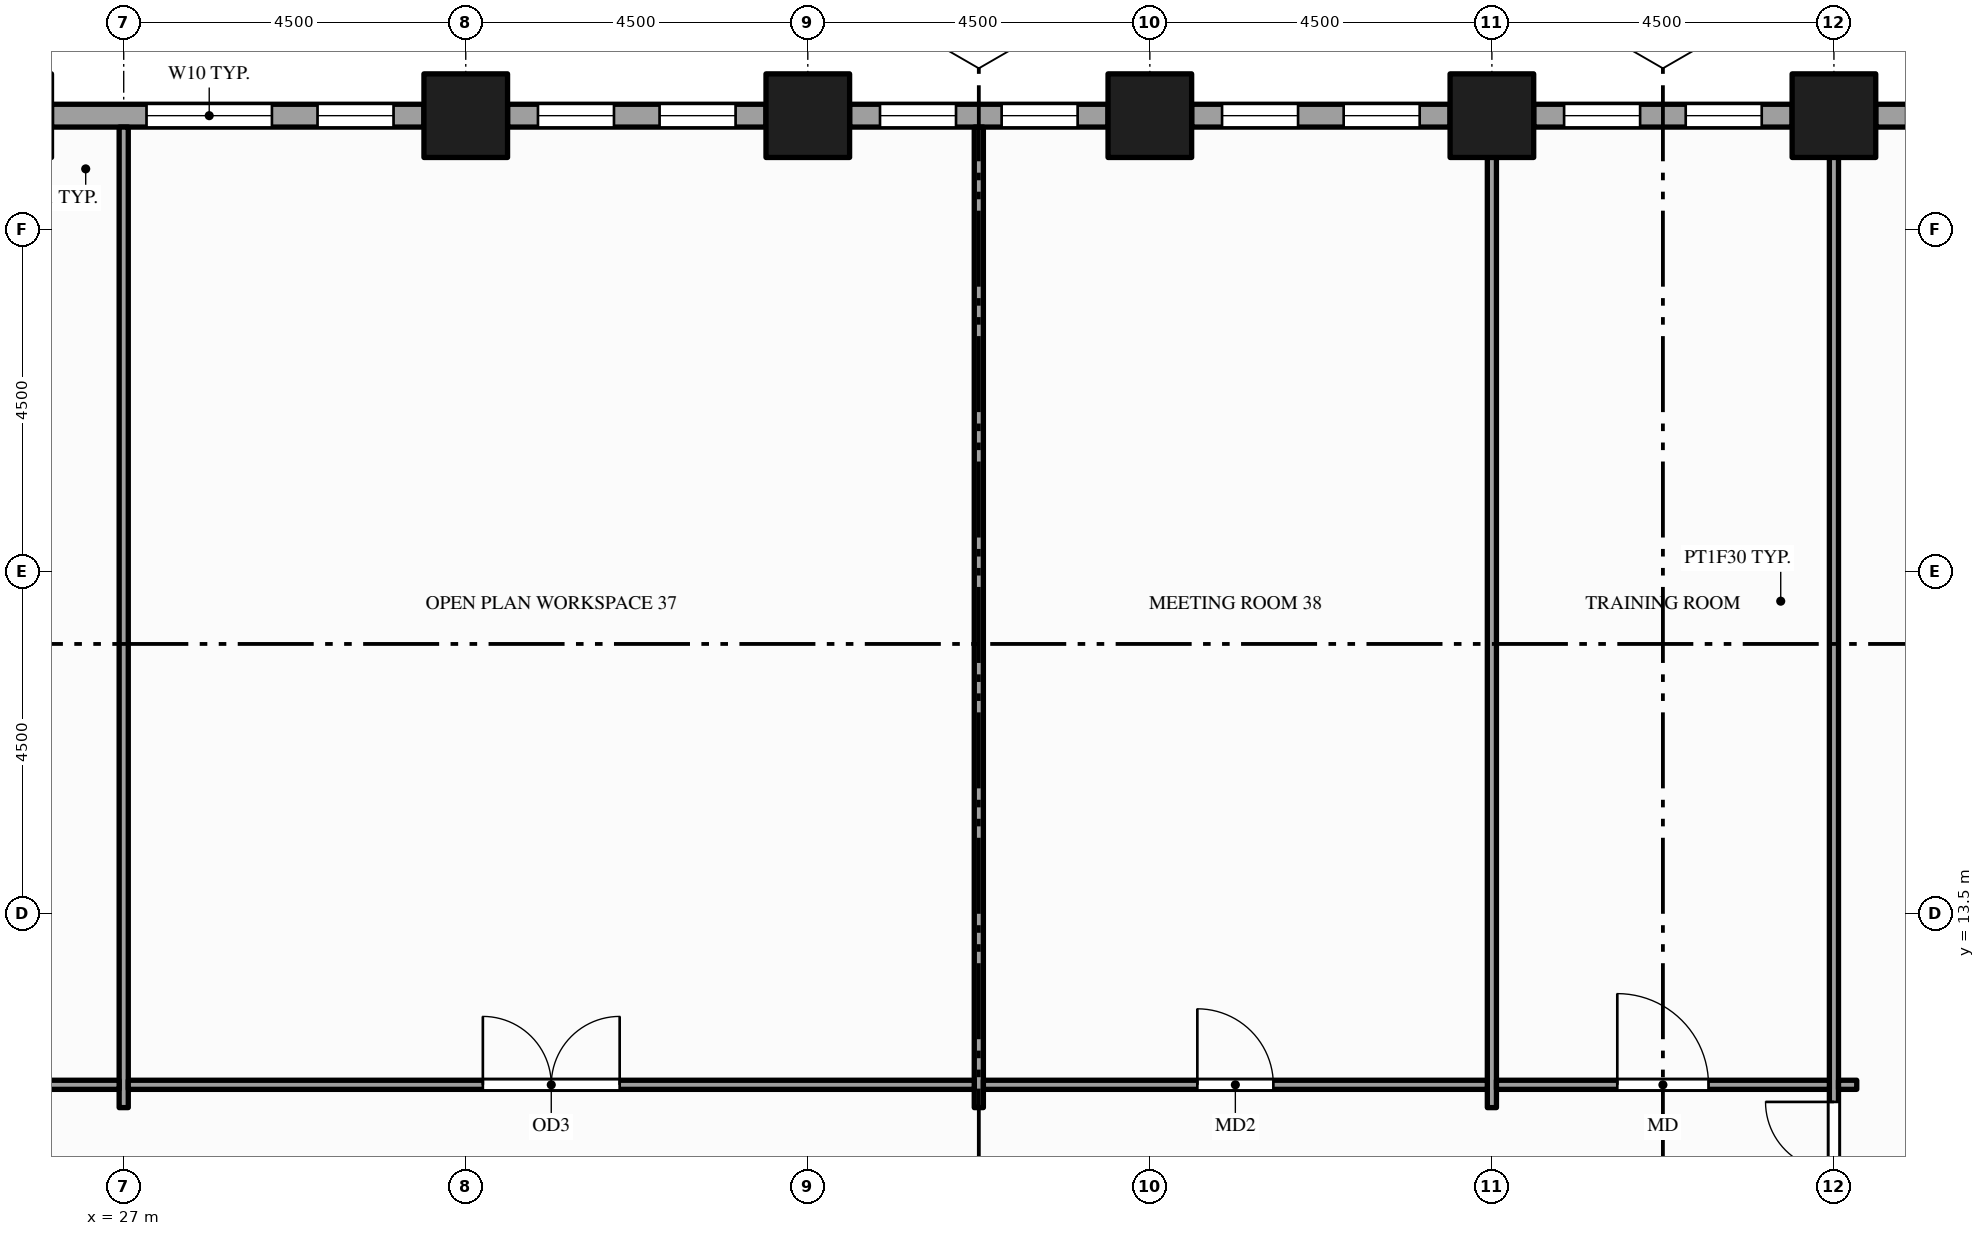
"""IFC4 building model, lengths in metres.
Left out: names, types, materials, properties, quantities, classifications, styles, units other than length and angle.
Written with IfcOpenShell. Run it as: python <this file> out.ifc"""

import sys

from ifc_helpers import new_model, si_unit, direction, frame, frame_2d, origin, origin_2d, place, context, subcontext, project, spatial, rectangle, hollow_rectangle, extrude, element, fill, save


model = new_model("IFC4")
c1 = context("Model", 3, precision=1e-05, world=origin(), true_north=direction((0.0, 1.0)))
c2 = subcontext(c1, "Body", "Model", "MODEL_VIEW")
j1 = project(units=[si_unit("LENGTHUNIT", "METRE"), si_unit("PLANEANGLEUNIT", "RADIAN")], contexts=[c1])
p1 = place(None, origin())
s1 = spatial("IfcSite", under=j1, at=p1, CompositionType="ELEMENT")
p2 = place(p1, origin())
s2 = spatial("IfcBuilding", under=s1, at=p2, CompositionType="ELEMENT")
p3 = place(p2, frame((0.0, 0.0, 33.0)))
s3 = spatial("IfcBuildingStorey", under=s2, at=p3, CompositionType="ELEMENT", Elevation=33.0)
for number, where, z_axis, x_axis in (
    (1, (31.5, 24.0, -0.15), (0.0, 0.0, 1.0), (1.0, 0.0, 0.0)),
    (2, (36.0, 24.0, -0.15), (0.0, 0.0, 1.0), (1.0, 0.0, 0.0)),
    (3, (40.5, 24.0, -0.15), (0.0, 0.0, 1.0), (1.0, 0.0, 0.0)),
    (4, (45.0, 24.0, -0.15), (0.0, 0.0, 1.0), (1.0, 0.0, 0.0)),
    (5, (49.5, 24.0, -0.15), (0.0, 0.0, 1.0), (1.0, 0.0, 0.0)),
):
    element("IfcColumn", number, at=place(p3, frame(where, z_axis=z_axis, x_axis=x_axis)), inside=s3, PredefinedType="COLUMN", context=c2, shape_type="SweptSolid", body=[
        extrude(hollow_rectangle(XDim=1.1, YDim=1.1, WallThickness=0.06, at=origin_2d()), origin(), (0.0, 0.0, 1.0), 4.0),
    ])
p4 = place(p3, frame((53.45, 24.0, 0.0), z_axis=(0.0, 0.0, 1.0), x_axis=(-1.0, 0.0, 0.0)))
e6 = element("IfcWall", 6, at=p4, inside=s3, PredefinedType="STANDARD", context=c2, shape_type="SweptSolid", body=[
    extrude(rectangle(XDim=3.4, YDim=0.3, at=frame_2d((1.7, 0.0))), origin(), (0.0, 0.0, 1.0), 3.144),
])
p5 = place(p4, frame((0.4, 0.0, 0.9)))
e7 = element("IfcOpeningElement", 7, at=p5, cuts=e6, PredefinedType="OPENING", context=c2, shape_type="SweptSolid", body=[
    extrude(rectangle(XDim=1.0, YDim=2.0, at=frame_2d((0.5, 1.0))), frame((0.0, 0.16, 0.0), z_axis=(0.0, -1.0, 0.0), x_axis=(1.0, 0.0, 0.0)), (0.0, 0.0, 1.0), 0.32),
])
p6 = place(p4, frame((2.0, 0.0, 0.9)))
e8 = element("IfcOpeningElement", 8, at=p6, cuts=e6, PredefinedType="OPENING", context=c2, shape_type="SweptSolid", body=[
    extrude(rectangle(XDim=1.0, YDim=2.0, at=frame_2d((0.5, 1.0))), frame((0.0, 0.16, 0.0), z_axis=(0.0, -1.0, 0.0), x_axis=(1.0, 0.0, 0.0)), (0.0, 0.0, 1.0), 0.32),
])
p7 = place(p3, frame((48.95, 24.0, 0.0), z_axis=(0.0, 0.0, 1.0), x_axis=(-1.0, 0.0, 0.0)))
e9 = element("IfcWall", 9, at=p7, inside=s3, PredefinedType="STANDARD", context=c2, shape_type="SweptSolid", body=[
    extrude(rectangle(XDim=3.4, YDim=0.3, at=frame_2d((1.7, 0.0))), origin(), (0.0, 0.0, 1.0), 3.144),
])
p8 = place(p7, frame((0.4, 0.0, 0.9)))
e10 = element("IfcOpeningElement", 10, at=p8, cuts=e9, PredefinedType="OPENING", context=c2, shape_type="SweptSolid", body=[
    extrude(rectangle(XDim=1.0, YDim=2.0, at=frame_2d((0.5, 1.0))), frame((0.0, 0.16, 0.0), z_axis=(0.0, -1.0, 0.0), x_axis=(1.0, 0.0, 0.0)), (0.0, 0.0, 1.0), 0.32),
])
p9 = place(p7, frame((2.0, 0.0, 0.9)))
e11 = element("IfcOpeningElement", 11, at=p9, cuts=e9, PredefinedType="OPENING", context=c2, shape_type="SweptSolid", body=[
    extrude(rectangle(XDim=1.0, YDim=2.0, at=frame_2d((0.5, 1.0))), frame((0.0, 0.16, 0.0), z_axis=(0.0, -1.0, 0.0), x_axis=(1.0, 0.0, 0.0)), (0.0, 0.0, 1.0), 0.32),
])
p10 = place(p3, frame((44.45, 24.0, 0.0), z_axis=(0.0, 0.0, 1.0), x_axis=(-1.0, 0.0, 0.0)))
e12 = element("IfcWall", 12, at=p10, inside=s3, PredefinedType="STANDARD", context=c2, shape_type="SweptSolid", body=[
    extrude(rectangle(XDim=3.4, YDim=0.3, at=frame_2d((1.7, 0.0))), origin(), (0.0, 0.0, 1.0), 3.144),
])
p11 = place(p10, frame((0.4, 0.0, 0.9)))
e13 = element("IfcOpeningElement", 13, at=p11, cuts=e12, PredefinedType="OPENING", context=c2, shape_type="SweptSolid", body=[
    extrude(rectangle(XDim=1.0, YDim=2.0, at=frame_2d((0.5, 1.0))), frame((0.0, 0.16, 0.0), z_axis=(0.0, -1.0, 0.0), x_axis=(1.0, 0.0, 0.0)), (0.0, 0.0, 1.0), 0.32),
])
p12 = place(p10, frame((2.0, 0.0, 0.9)))
e14 = element("IfcOpeningElement", 14, at=p12, cuts=e12, PredefinedType="OPENING", context=c2, shape_type="SweptSolid", body=[
    extrude(rectangle(XDim=1.0, YDim=2.0, at=frame_2d((0.5, 1.0))), frame((0.0, 0.16, 0.0), z_axis=(0.0, -1.0, 0.0), x_axis=(1.0, 0.0, 0.0)), (0.0, 0.0, 1.0), 0.32),
])
p13 = place(p3, frame((39.95, 24.0, 0.0), z_axis=(0.0, 0.0, 1.0), x_axis=(-1.0, 0.0, 0.0)))
e15 = element("IfcWall", 15, at=p13, inside=s3, PredefinedType="STANDARD", context=c2, shape_type="SweptSolid", body=[
    extrude(rectangle(XDim=3.4, YDim=0.3, at=frame_2d((1.7, 0.0))), origin(), (0.0, 0.0, 1.0), 3.144),
])
p14 = place(p13, frame((0.4, 0.0, 0.9)))
e16 = element("IfcOpeningElement", 16, at=p14, cuts=e15, PredefinedType="OPENING", context=c2, shape_type="SweptSolid", body=[
    extrude(rectangle(XDim=1.0, YDim=2.0, at=frame_2d((0.5, 1.0))), frame((0.0, 0.16, 0.0), z_axis=(0.0, -1.0, 0.0), x_axis=(1.0, 0.0, 0.0)), (0.0, 0.0, 1.0), 0.32),
])
p15 = place(p13, frame((2.0, 0.0, 0.9)))
e17 = element("IfcOpeningElement", 17, at=p15, cuts=e15, PredefinedType="OPENING", context=c2, shape_type="SweptSolid", body=[
    extrude(rectangle(XDim=1.0, YDim=2.0, at=frame_2d((0.5, 1.0))), frame((0.0, 0.16, 0.0), z_axis=(0.0, -1.0, 0.0), x_axis=(1.0, 0.0, 0.0)), (0.0, 0.0, 1.0), 0.32),
])
p16 = place(p3, frame((35.45, 24.0, 0.0), z_axis=(0.0, 0.0, 1.0), x_axis=(-1.0, 0.0, 0.0)))
e18 = element("IfcWall", 18, at=p16, inside=s3, PredefinedType="STANDARD", context=c2, shape_type="SweptSolid", body=[
    extrude(rectangle(XDim=3.4, YDim=0.3, at=frame_2d((1.7, 0.0))), origin(), (0.0, 0.0, 1.0), 3.144),
])
p17 = place(p16, frame((0.4, 0.0, 0.9)))
e19 = element("IfcOpeningElement", 19, at=p17, cuts=e18, PredefinedType="OPENING", context=c2, shape_type="SweptSolid", body=[
    extrude(rectangle(XDim=1.0, YDim=2.0, at=frame_2d((0.5, 1.0))), frame((0.0, 0.16, 0.0), z_axis=(0.0, -1.0, 0.0), x_axis=(1.0, 0.0, 0.0)), (0.0, 0.0, 1.0), 0.32),
])
p18 = place(p16, frame((2.0, 0.0, 0.9)))
e20 = element("IfcOpeningElement", 20, at=p18, cuts=e18, PredefinedType="OPENING", context=c2, shape_type="SweptSolid", body=[
    extrude(rectangle(XDim=1.0, YDim=2.0, at=frame_2d((0.5, 1.0))), frame((0.0, 0.16, 0.0), z_axis=(0.0, -1.0, 0.0), x_axis=(1.0, 0.0, 0.0)), (0.0, 0.0, 1.0), 0.32),
])
p19 = place(p3, frame((30.95, 24.0, 0.0), z_axis=(0.0, 0.0, 1.0), x_axis=(-1.0, 0.0, 0.0)))
e21 = element("IfcWall", 21, at=p19, inside=s3, PredefinedType="STANDARD", context=c2, shape_type="SweptSolid", body=[
    extrude(rectangle(XDim=4.9, YDim=0.3, at=frame_2d((2.45, 0.0))), origin(), (0.0, 0.0, 1.0), 3.144),
])
p20 = place(p19, frame((0.4, 0.0, 0.9)))
e22 = element("IfcOpeningElement", 22, at=p20, cuts=e21, PredefinedType="OPENING", context=c2, shape_type="SweptSolid", body=[
    extrude(rectangle(XDim=1.0, YDim=2.0, at=frame_2d((0.5, 1.0))), frame((0.0, 0.16, 0.0), z_axis=(0.0, -1.0, 0.0), x_axis=(1.0, 0.0, 0.0)), (0.0, 0.0, 1.0), 0.32),
])
p21 = place(p19, frame((2.0, 0.0, 0.9)))
e23 = element("IfcOpeningElement", 23, at=p21, cuts=e21, PredefinedType="OPENING", context=c2, shape_type="SweptSolid", body=[
    extrude(rectangle(XDim=1.65, YDim=2.0, at=frame_2d((0.825, 1.0))), frame((0.0, 0.16, 0.0), z_axis=(0.0, -1.0, 0.0), x_axis=(1.0, 0.0, 0.0)), (0.0, 0.0, 1.0), 0.32),
])
for number, where, z_axis, x_axis in (
    (24, (27.0, 10.95, 0.0), (0.0, 0.0, 1.0), (0.0, 1.0, 0.0)),
    (25, (38.25, 10.95, 0.0), (0.0, 0.0, 1.0), (0.0, 1.0, 0.0)),
    (26, (45.0, 10.95, 0.0), (0.0, 0.0, 1.0), (0.0, 1.0, 0.0)),
):
    element("IfcWall", number, at=place(p3, frame(where, z_axis=z_axis, x_axis=x_axis)), inside=s3, PredefinedType="PARTITIONING", context=c2, shape_type="SweptSolid", body=[
        extrude(rectangle(XDim=12.9, YDim=0.12, at=frame_2d((6.45, 0.0))), origin(), (0.0, 0.0, 1.0), 2.938),
    ])
p22 = place(p3, frame((49.5, 1.65, 0.0), z_axis=(0.0, 0.0, 1.0), x_axis=(0.0, 1.0, 0.0)))
e27 = element("IfcWall", 27, at=p22, inside=s3, PredefinedType="PARTITIONING", context=c2, shape_type="SweptSolid", body=[
    extrude(rectangle(XDim=22.2, YDim=0.12, at=frame_2d((11.1, 0.0))), origin(), (0.0, 0.0, 1.0), 2.938),
])
p23 = place(p22, frame((7.575, 0.0, 0.0)))
e28 = element("IfcOpeningElement", 28, at=p23, cuts=e27, PredefinedType="OPENING", context=c2, shape_type="SweptSolid", body=[
    extrude(rectangle(XDim=1.8, YDim=2.1, at=frame_2d((0.9, 1.05))), frame((0.0, 0.07, 0.0), z_axis=(0.0, -1.0, 0.0), x_axis=(1.0, 0.0, 0.0)), (0.0, 0.0, 1.0), 0.14),
])
p24 = place(p22, frame((0.85, 0.0, 0.0)))
e29 = element("IfcOpeningElement", 29, at=p24, cuts=e27, PredefinedType="OPENING", context=c2, shape_type="SweptSolid", body=[
    extrude(rectangle(XDim=0.9, YDim=2.1, at=frame_2d((0.45, 1.05))), frame((0.0, 0.07, 0.0), z_axis=(0.0, -1.0, 0.0), x_axis=(1.0, 0.0, 0.0)), (0.0, 0.0, 1.0), 0.14),
])
p25 = place(p22, frame((3.15, 0.0, 0.0)))
e30 = element("IfcOpeningElement", 30, at=p25, cuts=e27, PredefinedType="OPENING", context=c2, shape_type="SweptSolid", body=[
    extrude(rectangle(XDim=0.9, YDim=2.1, at=frame_2d((0.45, 1.05))), frame((0.0, 0.07, 0.0), z_axis=(0.0, -1.0, 0.0), x_axis=(1.0, 0.0, 0.0)), (0.0, 0.0, 1.0), 0.14),
])
p26 = place(p22, frame((5.35, 0.0, 0.0)))
e31 = element("IfcOpeningElement", 31, at=p26, cuts=e27, PredefinedType="OPENING", context=c2, shape_type="SweptSolid", body=[
    extrude(rectangle(XDim=1.0, YDim=2.1, at=frame_2d((0.5, 1.05))), frame((0.0, 0.07, 0.0), z_axis=(0.0, -1.0, 0.0), x_axis=(1.0, 0.0, 0.0)), (0.0, 0.0, 1.0), 0.14),
])
p27 = place(p3, frame((11.31, 11.25, 0.0), z_axis=(0.0, 0.0, 1.0), x_axis=(1.0, 0.0, 0.0)))
e32 = element("IfcWall", 32, at=p27, inside=s3, PredefinedType="PARTITIONING", context=c2, shape_type="SweptSolid", body=[
    extrude(rectangle(XDim=15.63, YDim=0.12, at=frame_2d((7.815, 0.0))), origin(), (0.0, 0.0, 1.0), 2.938),
])
p28 = place(p27, frame((3.54, 0.0, 0.0)))
e33 = element("IfcOpeningElement", 33, at=p28, cuts=e32, PredefinedType="OPENING", context=c2, shape_type="SweptSolid", body=[
    extrude(rectangle(XDim=1.8, YDim=2.1, at=frame_2d((0.9, 1.05))), frame((0.0, 0.07, 0.0), z_axis=(0.0, -1.0, 0.0), x_axis=(1.0, 0.0, 0.0)), (0.0, 0.0, 1.0), 0.14),
])
p29 = place(p3, frame((27.06, 11.25, 0.0), z_axis=(0.0, 0.0, 1.0), x_axis=(1.0, 0.0, 0.0)))
e34 = element("IfcWall", 34, at=p29, inside=s3, PredefinedType="PARTITIONING", context=c2, shape_type="SweptSolid", body=[
    extrude(rectangle(XDim=11.13, YDim=0.12, at=frame_2d((5.565, 0.0))), origin(), (0.0, 0.0, 1.0), 2.938),
])
p30 = place(p29, frame((4.665, 0.0, 0.0)))
e35 = element("IfcOpeningElement", 35, at=p30, cuts=e34, PredefinedType="OPENING", context=c2, shape_type="SweptSolid", body=[
    extrude(rectangle(XDim=1.8, YDim=2.1, at=frame_2d((0.9, 1.05))), frame((0.0, 0.07, 0.0), z_axis=(0.0, -1.0, 0.0), x_axis=(1.0, 0.0, 0.0)), (0.0, 0.0, 1.0), 0.14),
])
p31 = place(p3, frame((38.31, 11.25, 0.0), z_axis=(0.0, 0.0, 1.0), x_axis=(1.0, 0.0, 0.0)))
e36 = element("IfcWall", 36, at=p31, inside=s3, PredefinedType="PARTITIONING", context=c2, shape_type="SweptSolid", body=[
    extrude(rectangle(XDim=6.63, YDim=0.12, at=frame_2d((3.315, 0.0))), origin(), (0.0, 0.0, 1.0), 2.938),
])
p32 = place(p31, frame((2.815, 0.0, 0.0)))
e37 = element("IfcOpeningElement", 37, at=p32, cuts=e36, PredefinedType="OPENING", context=c2, shape_type="SweptSolid", body=[
    extrude(rectangle(XDim=1.0, YDim=2.1, at=frame_2d((0.5, 1.05))), frame((0.0, 0.07, 0.0), z_axis=(0.0, -1.0, 0.0), x_axis=(1.0, 0.0, 0.0)), (0.0, 0.0, 1.0), 0.14),
])
p33 = place(p3, frame((45.06, 11.25, 0.0), z_axis=(0.0, 0.0, 1.0), x_axis=(1.0, 0.0, 0.0)))
e38 = element("IfcWall", 38, at=p33, inside=s3, PredefinedType="PARTITIONING", context=c2, shape_type="SweptSolid", body=[
    extrude(rectangle(XDim=4.38, YDim=0.12, at=frame_2d((2.19, 0.0))), origin(), (0.0, 0.0, 1.0), 2.938),
])
p34 = place(p33, frame((1.59, 0.0, 0.0)))
e39 = element("IfcOpeningElement", 39, at=p34, cuts=e38, PredefinedType="OPENING", context=c2, shape_type="SweptSolid", body=[
    extrude(rectangle(XDim=1.2, YDim=2.1, at=frame_2d((0.6, 1.05))), frame((0.0, 0.07, 0.0), z_axis=(0.0, -1.0, 0.0), x_axis=(1.0, 0.0, 0.0)), (0.0, 0.0, 1.0), 0.14),
])
p35 = place(p3, frame((49.56, 11.25, 0.0), z_axis=(0.0, 0.0, 1.0), x_axis=(1.0, 0.0, 0.0)))
e40 = element("IfcWall", 40, at=p35, inside=s3, PredefinedType="PARTITIONING", context=c2, shape_type="SweptSolid", body=[
    extrude(rectangle(XDim=0.24, YDim=0.12, at=frame_2d((0.12, 0.0))), origin(), (0.0, 0.0, 1.0), 2.938),
])
p36 = place(p8, origin())
e41 = element("IfcWindow", 41, at=p36, inside=s3, PartitioningType="SINGLE_PANEL", PredefinedType="WINDOW", context=c2, shape_type="SweptSolid", body=[
    extrude(rectangle(XDim=1.0, YDim=2.0, at=frame_2d((0.5, 1.0))), frame((0.0, 0.03, 0.0), z_axis=(0.0, -1.0, 0.0), x_axis=(1.0, 0.0, 0.0)), (0.0, 0.0, 1.0), 0.06),
])
fill(e10, e41)
p37 = place(p9, origin())
e42 = element("IfcWindow", 42, at=p37, inside=s3, PartitioningType="SINGLE_PANEL", PredefinedType="WINDOW", context=c2, shape_type="SweptSolid", body=[
    extrude(rectangle(XDim=1.0, YDim=2.0, at=frame_2d((0.5, 1.0))), frame((0.0, 0.03, 0.0), z_axis=(0.0, -1.0, 0.0), x_axis=(1.0, 0.0, 0.0)), (0.0, 0.0, 1.0), 0.06),
])
fill(e11, e42)
p38 = place(p11, origin())
e43 = element("IfcWindow", 43, at=p38, inside=s3, PartitioningType="SINGLE_PANEL", PredefinedType="WINDOW", context=c2, shape_type="SweptSolid", body=[
    extrude(rectangle(XDim=1.0, YDim=2.0, at=frame_2d((0.5, 1.0))), frame((0.0, 0.03, 0.0), z_axis=(0.0, -1.0, 0.0), x_axis=(1.0, 0.0, 0.0)), (0.0, 0.0, 1.0), 0.06),
])
fill(e13, e43)
p39 = place(p12, origin())
e44 = element("IfcWindow", 44, at=p39, inside=s3, PartitioningType="SINGLE_PANEL", PredefinedType="WINDOW", context=c2, shape_type="SweptSolid", body=[
    extrude(rectangle(XDim=1.0, YDim=2.0, at=frame_2d((0.5, 1.0))), frame((0.0, 0.03, 0.0), z_axis=(0.0, -1.0, 0.0), x_axis=(1.0, 0.0, 0.0)), (0.0, 0.0, 1.0), 0.06),
])
fill(e14, e44)
p40 = place(p14, origin())
e45 = element("IfcWindow", 45, at=p40, inside=s3, PartitioningType="SINGLE_PANEL", PredefinedType="WINDOW", context=c2, shape_type="SweptSolid", body=[
    extrude(rectangle(XDim=1.0, YDim=2.0, at=frame_2d((0.5, 1.0))), frame((0.0, 0.03, 0.0), z_axis=(0.0, -1.0, 0.0), x_axis=(1.0, 0.0, 0.0)), (0.0, 0.0, 1.0), 0.06),
])
fill(e16, e45)
p41 = place(p15, origin())
e46 = element("IfcWindow", 46, at=p41, inside=s3, PartitioningType="SINGLE_PANEL", PredefinedType="WINDOW", context=c2, shape_type="SweptSolid", body=[
    extrude(rectangle(XDim=1.0, YDim=2.0, at=frame_2d((0.5, 1.0))), frame((0.0, 0.03, 0.0), z_axis=(0.0, -1.0, 0.0), x_axis=(1.0, 0.0, 0.0)), (0.0, 0.0, 1.0), 0.06),
])
fill(e17, e46)
p42 = place(p17, origin())
e47 = element("IfcWindow", 47, at=p42, inside=s3, PartitioningType="SINGLE_PANEL", PredefinedType="WINDOW", context=c2, shape_type="SweptSolid", body=[
    extrude(rectangle(XDim=1.0, YDim=2.0, at=frame_2d((0.5, 1.0))), frame((0.0, 0.03, 0.0), z_axis=(0.0, -1.0, 0.0), x_axis=(1.0, 0.0, 0.0)), (0.0, 0.0, 1.0), 0.06),
])
fill(e19, e47)
p43 = place(p18, origin())
e48 = element("IfcWindow", 48, at=p43, inside=s3, PartitioningType="SINGLE_PANEL", PredefinedType="WINDOW", context=c2, shape_type="SweptSolid", body=[
    extrude(rectangle(XDim=1.0, YDim=2.0, at=frame_2d((0.5, 1.0))), frame((0.0, 0.03, 0.0), z_axis=(0.0, -1.0, 0.0), x_axis=(1.0, 0.0, 0.0)), (0.0, 0.0, 1.0), 0.06),
])
fill(e20, e48)
p44 = place(p20, origin())
e49 = element("IfcWindow", 49, at=p44, inside=s3, PartitioningType="SINGLE_PANEL", PredefinedType="WINDOW", context=c2, shape_type="SweptSolid", body=[
    extrude(rectangle(XDim=1.0, YDim=2.0, at=frame_2d((0.5, 1.0))), frame((0.0, 0.03, 0.0), z_axis=(0.0, -1.0, 0.0), x_axis=(1.0, 0.0, 0.0)), (0.0, 0.0, 1.0), 0.06),
])
fill(e22, e49)
p45 = place(p21, origin())
e50 = element("IfcWindow", 50, at=p45, inside=s3, PartitioningType="SINGLE_PANEL", PredefinedType="WINDOW", context=c2, shape_type="SweptSolid", body=[
    extrude(rectangle(XDim=1.65, YDim=2.0, at=frame_2d((0.825, 1.0))), frame((0.0, 0.03, 0.0), z_axis=(0.0, -1.0, 0.0), x_axis=(1.0, 0.0, 0.0)), (0.0, 0.0, 1.0), 0.06),
])
fill(e23, e50)
p46 = place(p23, origin())
e51 = element("IfcDoor", 51, at=p46, inside=s3, OperationType="DOUBLE_DOOR_SINGLE_SWING", PredefinedType="DOOR", context=c2, shape_type="SweptSolid", body=[
    extrude(rectangle(XDim=1.8, YDim=2.1, at=frame_2d((0.9, 1.05))), frame((0.0, 0.025, 0.0), z_axis=(0.0, -1.0, 0.0), x_axis=(1.0, 0.0, 0.0)), (0.0, 0.0, 1.0), 0.05),
])
fill(e28, e51)
p47 = place(p30, origin())
e52 = element("IfcDoor", 52, at=p47, inside=s3, OperationType="DOUBLE_DOOR_SINGLE_SWING", PredefinedType="DOOR", context=c2, shape_type="SweptSolid", body=[
    extrude(rectangle(XDim=1.8, YDim=2.1, at=frame_2d((0.9, 1.05))), frame((0.0, 0.025, 0.0), z_axis=(0.0, -1.0, 0.0), x_axis=(1.0, 0.0, 0.0)), (0.0, 0.0, 1.0), 0.05),
])
fill(e35, e52)
p48 = place(p32, origin())
e53 = element("IfcDoor", 53, at=p48, inside=s3, OperationType="SINGLE_SWING_LEFT", PredefinedType="DOOR", context=c2, shape_type="SweptSolid", body=[
    extrude(rectangle(XDim=1.0, YDim=2.1, at=frame_2d((0.5, 1.05))), frame((0.0, 0.025, 0.0), z_axis=(0.0, -1.0, 0.0), x_axis=(1.0, 0.0, 0.0)), (0.0, 0.0, 1.0), 0.05),
])
fill(e37, e53)
p49 = place(p34, origin())
e54 = element("IfcDoor", 54, at=p49, inside=s3, OperationType="SINGLE_SWING_LEFT", PredefinedType="DOOR", context=c2, shape_type="SweptSolid", body=[
    extrude(rectangle(XDim=1.2, YDim=2.1, at=frame_2d((0.6, 1.05))), frame((0.0, 0.025, 0.0), z_axis=(0.0, -1.0, 0.0), x_axis=(1.0, 0.0, 0.0)), (0.0, 0.0, 1.0), 0.05),
])
fill(e39, e54)
save(model, sys.argv[1])
